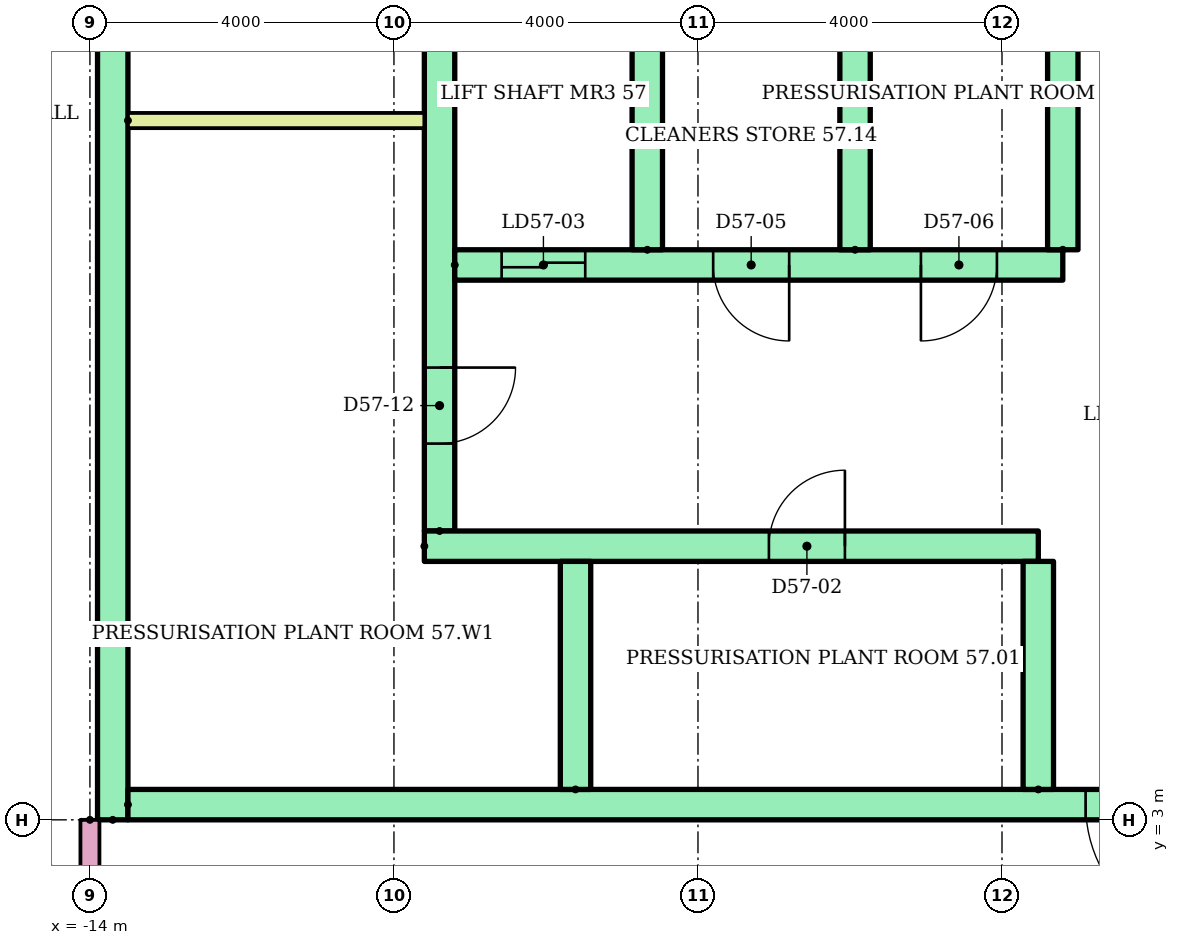
"""IFC4 building model, lengths in metres.
Left out: names, types, materials, properties, quantities, classifications, styles, units other than length and angle.
Written with IfcOpenShell. Run it as: python <this file> out.ifc"""

import sys

from ifc_helpers import new_model, si_unit, direction, frame, frame_2d, origin, place, context, subcontext, project, spatial, rectangle, extrude, element, fill, save


model = new_model("IFC4")
c1 = context("Model", 3, precision=1e-05, world=origin(), true_north=direction((0.0, 1.0)))
c2 = subcontext(c1, "Body", "Model", "MODEL_VIEW")
j1 = project(units=[si_unit("LENGTHUNIT", "METRE"), si_unit("PLANEANGLEUNIT", "RADIAN")], contexts=[c1])
p1 = place(None, origin())
s1 = spatial("IfcSite", under=j1, at=p1, CompositionType="ELEMENT")
p2 = place(p1, origin())
s2 = spatial("IfcBuilding", under=s1, at=p2, CompositionType="ELEMENT")
p3 = place(p2, frame((0.0, 0.0, 220.4)))
s3 = spatial("IfcBuildingStorey", under=s2, at=p3, CompositionType="ELEMENT", Elevation=220.4)
p4 = place(p3, frame((-13.7, 3.0, 0.0), z_axis=(0.0, 0.0, 1.0), x_axis=(0.0, 1.0, 0.0)))
e1 = element("IfcWall", 1, at=p4, inside=s3, PredefinedType="SHEAR", context=c2, shape_type="SweptSolid", body=[
    extrude(rectangle(XDim=17.0, YDim=0.4, at=frame_2d((8.5, 0.0))), origin(), (0.0, 0.0, 1.0), 2.92),
])
p5 = place(p3, frame((-9.4, 6.8, 0.0), z_axis=(0.0, 0.0, 1.0), x_axis=(0.0, 1.0, 0.0)))
e2 = element("IfcWall", 2, at=p5, inside=s3, PredefinedType="SHEAR", context=c2, shape_type="SweptSolid", body=[
    extrude(rectangle(XDim=12.7, YDim=0.4, at=frame_2d((6.35, 0.0))), origin(), (0.0, 0.0, 1.0), 2.92),
])
p6 = place(p5, frame((1.15, 0.0, 0.0)))
e3 = element("IfcOpeningElement", 3, at=p6, cuts=e2, PredefinedType="OPENING", context=c2, shape_type="SweptSolid", body=[
    extrude(rectangle(XDim=1.0, YDim=2.1, at=frame_2d((0.5, 1.05))), frame((0.0, 0.21, 0.0), z_axis=(0.0, -1.0, 0.0), x_axis=(1.0, 0.0, 0.0)), (0.0, 0.0, 1.0), 0.42),
])
p7 = place(p5, frame((7.925, 0.0, 0.0)))
e4 = element("IfcOpeningElement", 4, at=p7, cuts=e2, PredefinedType="OPENING", context=c2, shape_type="SweptSolid", body=[
    extrude(rectangle(XDim=1.0, YDim=2.1, at=frame_2d((0.5, 1.05))), frame((0.0, 0.21, 0.0), z_axis=(0.0, -1.0, 0.0), x_axis=(1.0, 0.0, 0.0)), (0.0, 0.0, 1.0), 0.42),
])
p8 = place(p3, frame((-13.5, 3.2, 0.0)))
e5 = element("IfcWall", 5, at=p8, inside=s3, PredefinedType="SHEAR", context=c2, shape_type="SweptSolid", body=[
    extrude(rectangle(XDim=27.0, YDim=0.4, at=frame_2d((13.5, 0.0))), origin(), (0.0, 0.0, 1.0), 2.92),
])
p9 = place(p8, frame((22.083, 0.0, 0.0)))
e6 = element("IfcOpeningElement", 6, at=p9, cuts=e5, PredefinedType="OPENING", context=c2, shape_type="SweptSolid", body=[
    extrude(rectangle(XDim=1.1, YDim=2.1, at=frame_2d((0.55, 1.05))), frame((0.0, 0.21, 0.0), z_axis=(0.0, -1.0, 0.0), x_axis=(1.0, 0.0, 0.0)), (0.0, 0.0, 1.0), 0.42),
])
p10 = place(p8, frame((25.128, 0.0, 0.0)))
e7 = element("IfcOpeningElement", 7, at=p10, cuts=e5, PredefinedType="OPENING", context=c2, shape_type="SweptSolid", body=[
    extrude(rectangle(XDim=1.1, YDim=2.1, at=frame_2d((0.55, 1.05))), frame((0.0, 0.21, 0.0), z_axis=(0.0, -1.0, 0.0), x_axis=(1.0, 0.0, 0.0)), (0.0, 0.0, 1.0), 0.42),
])
p11 = place(p8, frame((12.6, 0.0, 0.0)))
e8 = element("IfcOpeningElement", 8, at=p11, cuts=e5, PredefinedType="OPENING", context=c2, shape_type="SweptSolid", body=[
    extrude(rectangle(XDim=1.8, YDim=2.1, at=frame_2d((0.9, 1.05))), frame((0.0, 0.21, 0.0), z_axis=(0.0, -1.0, 0.0), x_axis=(1.0, 0.0, 0.0)), (0.0, 0.0, 1.0), 0.42),
])
p12 = place(p3, frame((-9.6, 6.6, 0.0)))
e9 = element("IfcWall", 9, at=p12, inside=s3, PredefinedType="SHEAR", context=c2, shape_type="SweptSolid", body=[
    extrude(rectangle(XDim=8.078, YDim=0.4, at=frame_2d((4.039, 0.0))), origin(), (0.0, 0.0, 1.0), 2.92),
])
p13 = place(p12, frame((4.533, 0.0, 0.0)))
e10 = element("IfcOpeningElement", 10, at=p13, cuts=e9, PredefinedType="OPENING", context=c2, shape_type="SweptSolid", body=[
    extrude(rectangle(XDim=1.0, YDim=2.1, at=frame_2d((0.5, 1.05))), frame((0.0, 0.21, 0.0), z_axis=(0.0, -1.0, 0.0), x_axis=(1.0, 0.0, 0.0)), (0.0, 0.0, 1.0), 0.42),
])
for number, where, z_axis, x_axis in (
    (11, (-7.611, 3.4, 0.0), (0.0, 0.0, 1.0), (0.0, 1.0, 0.0)),
    (12, (-1.522, 3.4, 0.0), (0.0, 0.0, 1.0), (0.0, 1.0, 0.0)),
):
    element("IfcWall", number, at=place(p3, frame(where, z_axis=z_axis, x_axis=x_axis)), inside=s3, PredefinedType="SHEAR", context=c2, shape_type="SweptSolid", body=[
        extrude(rectangle(XDim=3.0, YDim=0.4, at=frame_2d((1.5, 0.0))), origin(), (0.0, 0.0, 1.0), 2.92),
    ])
p14 = place(p3, frame((-9.2, 10.3, 0.0)))
e13 = element("IfcWall", 13, at=p14, inside=s3, PredefinedType="SHEAR", context=c2, shape_type="SweptSolid", body=[
    extrude(rectangle(XDim=8.0, YDim=0.4, at=frame_2d((4.0, 0.0))), origin(), (0.0, 0.0, 1.0), 2.92),
])
p15 = place(p14, frame((0.617, 0.0, 0.0)))
e14 = element("IfcOpeningElement", 14, at=p15, cuts=e13, PredefinedType="OPENING", context=c2, shape_type="SweptSolid", body=[
    extrude(rectangle(XDim=1.1, YDim=2.1, at=frame_2d((0.55, 1.05))), frame((0.0, 0.21, 0.0), z_axis=(0.0, -1.0, 0.0), x_axis=(1.0, 0.0, 0.0)), (0.0, 0.0, 1.0), 0.42),
])
p16 = place(p14, frame((3.4, 0.0, 0.0)))
e15 = element("IfcOpeningElement", 15, at=p16, cuts=e13, PredefinedType="OPENING", context=c2, shape_type="SweptSolid", body=[
    extrude(rectangle(XDim=1.0, YDim=2.1, at=frame_2d((0.5, 1.05))), frame((0.0, 0.21, 0.0), z_axis=(0.0, -1.0, 0.0), x_axis=(1.0, 0.0, 0.0)), (0.0, 0.0, 1.0), 0.42),
])
p17 = place(p14, frame((6.133, 0.0, 0.0)))
e16 = element("IfcOpeningElement", 16, at=p17, cuts=e13, PredefinedType="OPENING", context=c2, shape_type="SweptSolid", body=[
    extrude(rectangle(XDim=1.0, YDim=2.1, at=frame_2d((0.5, 1.05))), frame((0.0, 0.21, 0.0), z_axis=(0.0, -1.0, 0.0), x_axis=(1.0, 0.0, 0.0)), (0.0, 0.0, 1.0), 0.42),
])
for number, where, z_axis, x_axis in (
    (17, (-6.667, 10.5, 0.0), (0.0, 0.0, 1.0), (0.0, 1.0, 0.0)),
    (18, (-3.933, 10.5, 0.0), (0.0, 0.0, 1.0), (0.0, 1.0, 0.0)),
    (19, (-1.2, 10.5, 0.0), (0.0, 0.0, 1.0), (0.0, 1.0, 0.0)),
):
    element("IfcWall", number, at=place(p3, frame(where, z_axis=z_axis, x_axis=x_axis)), inside=s3, PredefinedType="SHEAR", context=c2, shape_type="SweptSolid", body=[
        extrude(rectangle(XDim=3.0, YDim=0.4, at=frame_2d((1.5, 0.0))), origin(), (0.0, 0.0, 1.0), 2.92),
    ])
p18 = place(p3, frame((-13.5, 12.2, 0.0)))
e20 = element("IfcWall", 20, at=p18, inside=s3, PredefinedType="PARTITIONING", context=c2, shape_type="SweptSolid", body=[
    extrude(rectangle(XDim=3.9, YDim=0.2, at=frame_2d((1.95, 0.0))), origin(), (0.0, 0.0, 1.0), 2.92),
])
p19 = place(p3, frame((-14.0, 3.0, 0.0), z_axis=(0.0, 0.0, 1.0), x_axis=(0.0, -1.0, 0.0)))
e21 = element("IfcWall", 21, at=p19, inside=s3, PredefinedType="PARTITIONING", context=c2, shape_type="SweptSolid", body=[
    extrude(rectangle(XDim=1.6, YDim=0.25, at=frame_2d((0.8, 0.0))), origin(), (0.0, 0.0, 1.0), 2.4),
])
p20 = place(p11, frame((1.8, 0.0, 0.0), z_axis=(0.0, 0.0, 1.0), x_axis=(-1.0, 0.0, 0.0)))
e22 = element("IfcDoor", 22, at=p20, inside=s3, OperationType="DOUBLE_DOOR_SINGLE_SWING", PredefinedType="DOOR", context=c2, shape_type="SweptSolid", body=[
    extrude(rectangle(XDim=1.8, YDim=2.1, at=frame_2d((0.9, 1.05))), frame((0.0, 0.025, 0.0), z_axis=(0.0, -1.0, 0.0), x_axis=(1.0, 0.0, 0.0)), (0.0, 0.0, 1.0), 0.05),
])
fill(e8, e22)
p21 = place(p13, origin())
e23 = element("IfcDoor", 23, at=p21, inside=s3, OperationType="SINGLE_SWING_RIGHT", PredefinedType="DOOR", context=c2, shape_type="SweptSolid", body=[
    extrude(rectangle(XDim=1.0, YDim=2.1, at=frame_2d((0.5, 1.05))), frame((0.0, 0.025, 0.0), z_axis=(0.0, -1.0, 0.0), x_axis=(1.0, 0.0, 0.0)), (0.0, 0.0, 1.0), 0.05),
])
fill(e10, e23)
p22 = place(p15, origin())
e24 = element("IfcDoor", 24, at=p22, inside=s3, OperationType="SLIDING_TO_LEFT", PredefinedType="DOOR", context=c2, shape_type="SweptSolid", body=[
    extrude(rectangle(XDim=1.1, YDim=2.1, at=frame_2d((0.55, 1.05))), frame((0.0, 0.025, 0.0), z_axis=(0.0, -1.0, 0.0), x_axis=(1.0, 0.0, 0.0)), (0.0, 0.0, 1.0), 0.05),
])
fill(e14, e24)
p23 = place(p16, frame((1.0, 0.0, 0.0), z_axis=(0.0, 0.0, 1.0), x_axis=(-1.0, 0.0, 0.0)))
e25 = element("IfcDoor", 25, at=p23, inside=s3, OperationType="SINGLE_SWING_RIGHT", PredefinedType="DOOR", context=c2, shape_type="SweptSolid", body=[
    extrude(rectangle(XDim=1.0, YDim=2.1, at=frame_2d((0.5, 1.05))), frame((0.0, 0.025, 0.0), z_axis=(0.0, -1.0, 0.0), x_axis=(1.0, 0.0, 0.0)), (0.0, 0.0, 1.0), 0.05),
])
fill(e15, e25)
p24 = place(p17, frame((1.0, 0.0, 0.0), z_axis=(0.0, 0.0, 1.0), x_axis=(-1.0, 0.0, 0.0)))
e26 = element("IfcDoor", 26, at=p24, inside=s3, OperationType="SINGLE_SWING_LEFT", PredefinedType="DOOR", context=c2, shape_type="SweptSolid", body=[
    extrude(rectangle(XDim=1.0, YDim=2.1, at=frame_2d((0.5, 1.05))), frame((0.0, 0.025, 0.0), z_axis=(0.0, -1.0, 0.0), x_axis=(1.0, 0.0, 0.0)), (0.0, 0.0, 1.0), 0.05),
])
fill(e16, e26)
p25 = place(p6, frame((1.0, 0.0, 0.0), z_axis=(0.0, 0.0, 1.0), x_axis=(-1.0, 0.0, 0.0)))
e27 = element("IfcDoor", 27, at=p25, inside=s3, OperationType="SINGLE_SWING_RIGHT", PredefinedType="DOOR", context=c2, shape_type="SweptSolid", body=[
    extrude(rectangle(XDim=1.0, YDim=2.1, at=frame_2d((0.5, 1.05))), frame((0.0, 0.025, 0.0), z_axis=(0.0, -1.0, 0.0), x_axis=(1.0, 0.0, 0.0)), (0.0, 0.0, 1.0), 0.05),
])
fill(e3, e27)
save(model, sys.argv[1])
